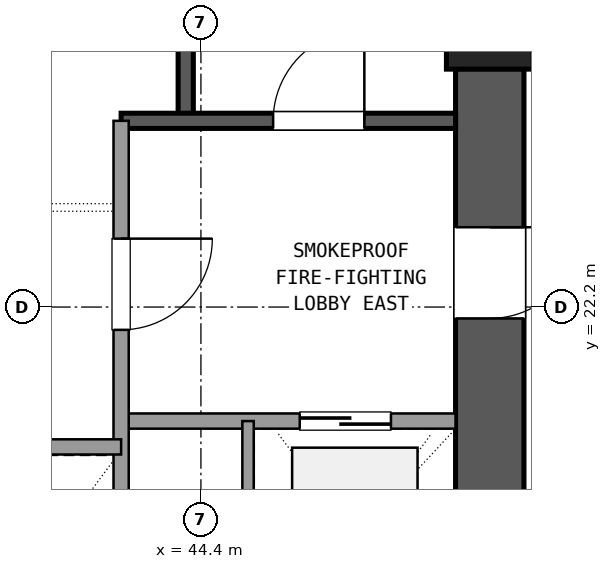
"""IFC4 building model, lengths in metres.
Left out: names, types, materials, properties, quantities, classifications, styles, units other than length and angle.
Written with IfcOpenShell. Run it as: python <this file> out.ifc"""

import sys

from ifc_helpers import new_model, si_unit, direction, frame, frame_2d, origin, origin_2d, place, context, subcontext, project, spatial, rectangle, extrude, element, fill, save


model = new_model("IFC4")
c1 = context("Model", 3, precision=1e-05, world=origin(), true_north=direction((0.0, 1.0)))
c2 = subcontext(c1, "Body", "Model", "MODEL_VIEW")
j1 = project(units=[si_unit("LENGTHUNIT", "METRE"), si_unit("PLANEANGLEUNIT", "RADIAN")], contexts=[c1])
p1 = place(None, origin())
s1 = spatial("IfcSite", under=j1, at=p1, CompositionType="ELEMENT")
p2 = place(p1, origin())
s2 = spatial("IfcBuilding", under=s1, at=p2, CompositionType="ELEMENT")
p3 = place(p2, frame((0.0, 0.0, 56.34)))
s3 = spatial("IfcBuildingStorey", under=s2, at=p3, CompositionType="ELEMENT", Elevation=56.34)
p4 = place(p3, frame((48.2, 25.9, 0.0), z_axis=(0.0, 0.0, 1.0), x_axis=(1.0, 0.0, 0.0)))
e1 = element("IfcColumn", 1, at=p4, inside=s3, PredefinedType="COLUMN", context=c2, shape_type="SweptSolid", body=[
    extrude(rectangle(XDim=1.14, YDim=1.14, at=origin_2d()), origin(), (0.0, 0.0, 1.0), 3.6),
])
p5 = place(p3, frame((48.2, 17.865, 0.0), z_axis=(0.0, 0.0, 1.0), x_axis=(0.0, 1.0, 0.0)))
e2 = element("IfcWall", 2, at=p5, inside=s3, PredefinedType="SHEAR", context=c2, shape_type="SweptSolid", body=[
    extrude(rectangle(XDim=7.47, YDim=0.9, at=frame_2d((3.735, 0.0))), origin(), (0.0, 0.0, 1.0), 3.32),
])
p6 = place(p5, frame((4.185, 0.0, 0.0)))
e3 = element("IfcOpeningElement", 3, at=p6, cuts=e2, PredefinedType="OPENING", context=c2, shape_type="SweptSolid", body=[
    extrude(rectangle(XDim=1.2, YDim=2.15, at=frame_2d((0.6, 1.075))), frame((0.0, 0.46, 0.0), z_axis=(0.0, -1.0, 0.0), x_axis=(1.0, 0.0, 0.0)), (0.0, 0.0, 1.0), 0.92),
])
p7 = place(p3, frame((44.2, 24.65, 0.0), z_axis=(0.0, 0.0, 1.0), x_axis=(0.0, 1.0, 0.0)))
e4 = element("IfcWall", 4, at=p7, inside=s3, PredefinedType="SHEAR", context=c2, shape_type="SweptSolid", body=[
    extrude(rectangle(XDim=9.4, YDim=0.2, at=frame_2d((4.7, 0.0))), origin(), (0.0, 0.0, 1.0), 3.32),
])
p8 = place(p3, frame((43.35, 24.65, 0.0), z_axis=(0.0, 0.0, 1.0), x_axis=(1.0, 0.0, 0.0)))
e5 = element("IfcWall", 5, at=p8, inside=s3, PredefinedType="SHEAR", context=c2, shape_type="SweptSolid", body=[
    extrude(rectangle(XDim=4.4, YDim=0.2, at=frame_2d((2.2, 0.0))), origin(), (0.0, 0.0, 1.0), 3.32),
])
p9 = place(p8, frame((2.0, 0.0, 0.0)))
e6 = element("IfcOpeningElement", 6, at=p9, cuts=e5, PredefinedType="OPENING", context=c2, shape_type="SweptSolid", body=[
    extrude(rectangle(XDim=1.2, YDim=2.15, at=frame_2d((0.6, 1.075))), frame((0.0, 0.11, 0.0), z_axis=(0.0, -1.0, 0.0), x_axis=(1.0, 0.0, 0.0)), (0.0, 0.0, 1.0), 0.22),
])
p10 = place(p3, frame((43.35, 20.7, 0.0), z_axis=(0.0, 0.0, 1.0), x_axis=(1.0, 0.0, 0.0)))
e7 = element("IfcWall", 7, at=p10, inside=s3, PredefinedType="SOLIDWALL", context=c2, shape_type="SweptSolid", body=[
    extrude(rectangle(XDim=4.4, YDim=0.2, at=frame_2d((2.2, 0.0))), origin(), (0.0, 0.0, 1.0), 2.61),
])
p11 = place(p10, frame((2.35, 0.0, 0.0)))
e8 = element("IfcOpeningElement", 8, at=p11, cuts=e7, PredefinedType="OPENING", context=c2, shape_type="SweptSolid", body=[
    extrude(rectangle(XDim=1.2, YDim=2.15, at=frame_2d((0.6, 1.075))), frame((0.0, 0.11, 0.0), z_axis=(0.0, -1.0, 0.0), x_axis=(1.0, 0.0, 0.0)), (0.0, 0.0, 1.0), 0.22),
])
p12 = place(p3, frame((43.35, 17.75, 0.0), z_axis=(0.0, 0.0, 1.0), x_axis=(0.0, 1.0, 0.0)))
e9 = element("IfcWall", 9, at=p12, inside=s3, PredefinedType="SOLIDWALL", context=c2, shape_type="SweptSolid", body=[
    extrude(rectangle(XDim=6.9, YDim=0.2, at=frame_2d((3.45, 0.0))), origin(), (0.0, 0.0, 1.0), 2.61),
])
p13 = place(p12, frame((4.15, 0.0, 0.0)))
e10 = element("IfcOpeningElement", 10, at=p13, cuts=e9, PredefinedType="OPENING", context=c2, shape_type="SweptSolid", body=[
    extrude(rectangle(XDim=1.2, YDim=2.15, at=frame_2d((0.6, 1.075))), frame((0.0, 0.11, 0.0), z_axis=(0.0, -1.0, 0.0), x_axis=(1.0, 0.0, 0.0)), (0.0, 0.0, 1.0), 0.22),
])
p14 = place(p3, frame((45.02, 17.75, 0.0), z_axis=(0.0, 0.0, 1.0), x_axis=(0.0, 1.0, 0.0)))
e11 = element("IfcWall", 11, at=p14, inside=s3, PredefinedType="PARTITIONING", context=c2, shape_type="SweptSolid", body=[
    extrude(rectangle(XDim=2.95, YDim=0.15, at=frame_2d((1.475, 0.0))), origin(), (0.0, 0.0, 1.0), 2.61),
])
p15 = place(p3, frame((37.25, 20.36, 0.0), z_axis=(0.0, 0.0, 1.0), x_axis=(1.0, 0.0, 0.0)))
e12 = element("IfcWall", 12, at=p15, inside=s3, PredefinedType="SOLIDWALL", context=c2, shape_type="SweptSolid", body=[
    extrude(rectangle(XDim=6.1, YDim=0.2, at=frame_2d((3.05, 0.0))), origin(), (0.0, 0.0, 1.0), 2.61),
])
p16 = place(p9, origin())
e13 = element("IfcDoor", 13, at=p16, inside=s3, OperationType="SINGLE_SWING_RIGHT", PredefinedType="DOOR", context=c2, shape_type="SweptSolid", body=[
    extrude(rectangle(XDim=1.2, YDim=2.15, at=frame_2d((0.6, 1.075))), frame((0.0, 0.025, 0.0), z_axis=(0.0, -1.0, 0.0), x_axis=(1.0, 0.0, 0.0)), (0.0, 0.0, 1.0), 0.05),
])
fill(e6, e13)
p17 = place(p11, origin())
e14 = element("IfcDoor", 14, at=p17, inside=s3, OperationType="SLIDING_TO_RIGHT", PredefinedType="DOOR", context=c2, shape_type="SweptSolid", body=[
    extrude(rectangle(XDim=1.2, YDim=2.15, at=frame_2d((0.6, 1.075))), frame((0.0, 0.025, 0.0), z_axis=(0.0, -1.0, 0.0), x_axis=(1.0, 0.0, 0.0)), (0.0, 0.0, 1.0), 0.05),
])
fill(e8, e14)
p18 = place(p13, frame((1.2, 0.0, 0.0), z_axis=(0.0, 0.0, 1.0), x_axis=(-1.0, 0.0, 0.0)))
e15 = element("IfcDoor", 15, at=p18, inside=s3, OperationType="SINGLE_SWING_RIGHT", PredefinedType="DOOR", context=c2, shape_type="SweptSolid", body=[
    extrude(rectangle(XDim=1.2, YDim=2.15, at=frame_2d((0.6, 1.075))), frame((0.0, 0.025, 0.0), z_axis=(0.0, -1.0, 0.0), x_axis=(1.0, 0.0, 0.0)), (0.0, 0.0, 1.0), 0.05),
])
fill(e10, e15)
p19 = place(p6, frame((1.2, 0.0, 0.0), z_axis=(0.0, 0.0, 1.0), x_axis=(-1.0, 0.0, 0.0)))
e16 = element("IfcDoor", 16, at=p19, inside=s3, OperationType="SINGLE_SWING_RIGHT", PredefinedType="DOOR", context=c2, shape_type="SweptSolid", body=[
    extrude(rectangle(XDim=1.2, YDim=2.15, at=frame_2d((0.6, 1.075))), frame((0.0, 0.025, 0.0), z_axis=(0.0, -1.0, 0.0), x_axis=(1.0, 0.0, 0.0)), (0.0, 0.0, 1.0), 0.05),
])
fill(e3, e16)
save(model, sys.argv[1])
